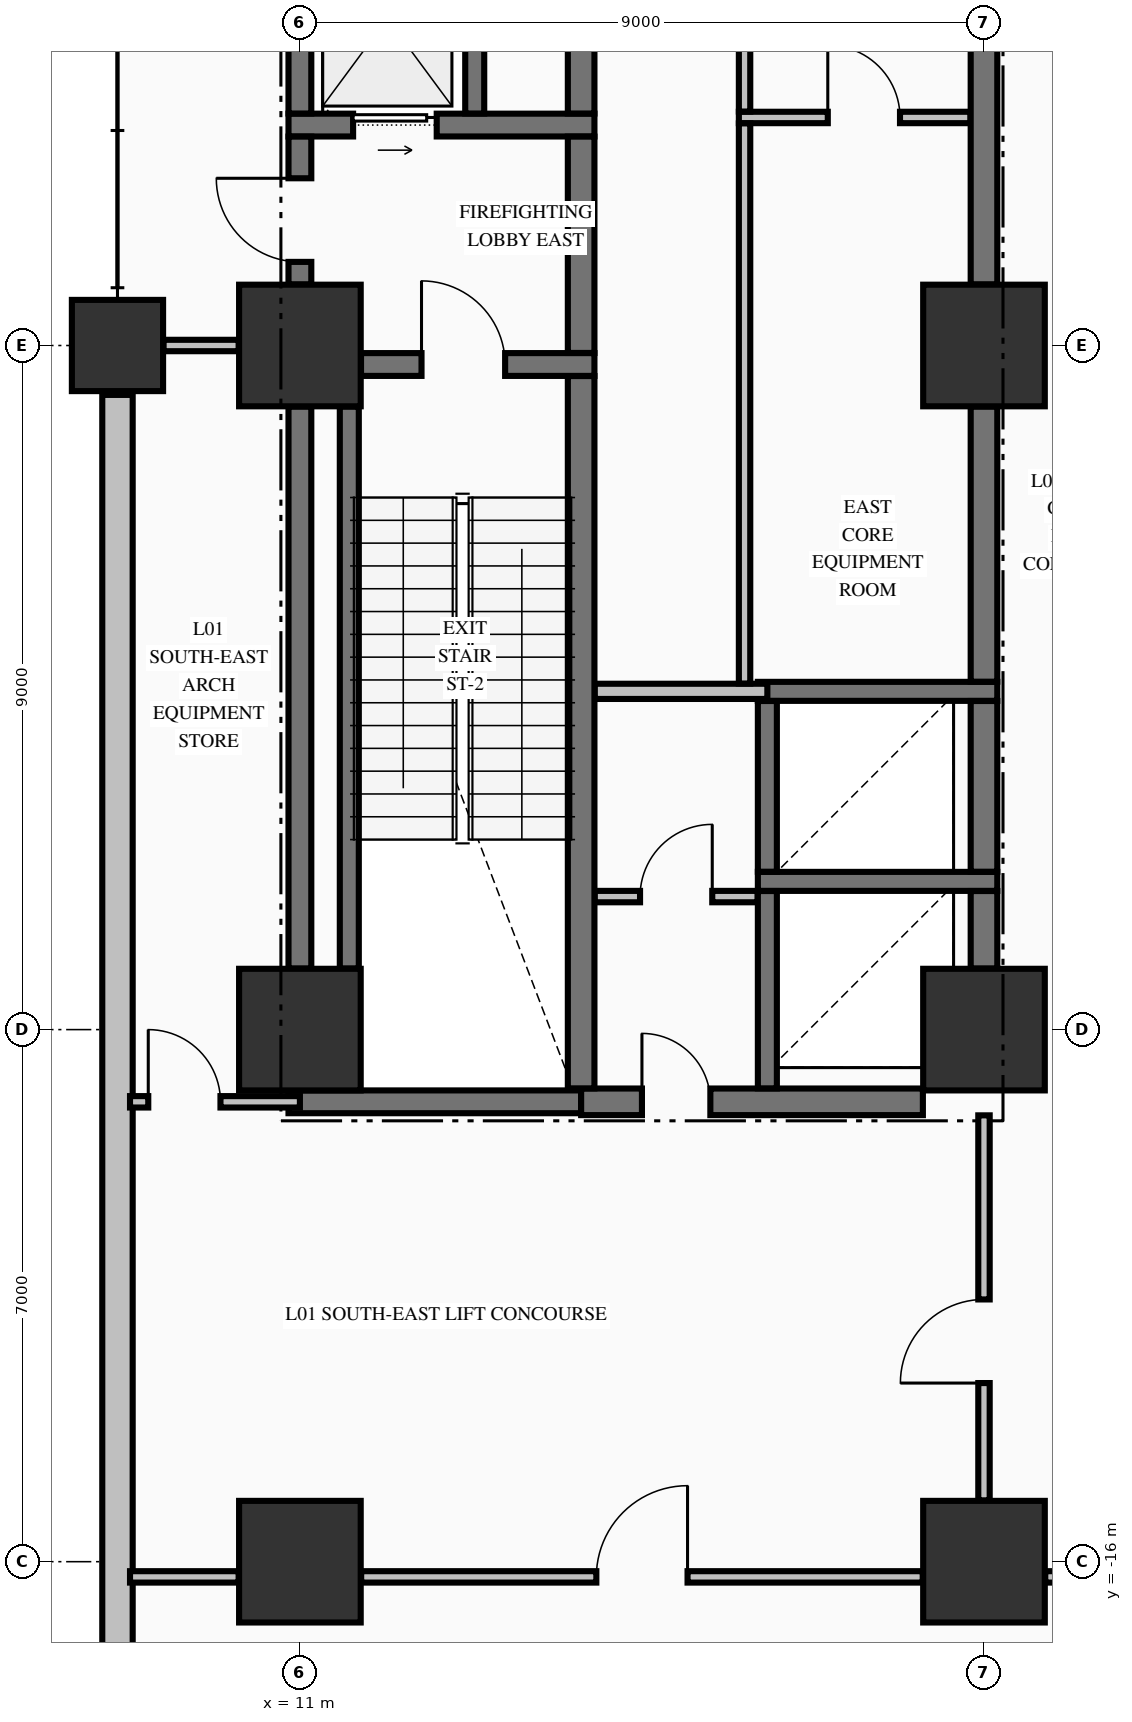
"""IFC4 building model, lengths in metres.
Left out: names, types, materials, properties, quantities, classifications, styles, units other than length and angle.
Written with IfcOpenShell. Run it as: python <this file> out.ifc"""

import sys

from ifc_helpers import new_model, si_unit, direction, frame, frame_2d, origin, origin_2d, place, context, subcontext, project, spatial, rectangle, extrude, element, fill, save


model = new_model("IFC4")
c1 = context("Model", 3, precision=1e-05, world=origin(), true_north=direction((0.0, 1.0)))
c2 = subcontext(c1, "Body", "Model", "MODEL_VIEW")
j1 = project(units=[si_unit("LENGTHUNIT", "METRE"), si_unit("PLANEANGLEUNIT", "RADIAN")], contexts=[c1])
p1 = place(None, origin())
s1 = spatial("IfcSite", under=j1, at=p1, CompositionType="ELEMENT")
p2 = place(p1, origin())
s2 = spatial("IfcBuilding", under=s1, at=p2, CompositionType="ELEMENT")
p3 = place(p2, frame((0.0, 0.0, 5.44)))
s3 = spatial("IfcBuildingStorey", under=s2, at=p3, CompositionType="ELEMENT", Elevation=5.44)
for number, where, z_axis, x_axis in (
    (1, (11.0, -16.0, 0.0), (0.0, 0.0, 1.0), (1.0, 0.0, 0.0)),
    (2, (11.0, -9.0, 0.0), (0.0, 0.0, 1.0), (1.0, 0.0, 0.0)),
    (3, (11.0, 0.0, 0.0), (0.0, 0.0, 1.0), (1.0, 0.0, 0.0)),
    (4, (20.0, -16.0, 0.0), (0.0, 0.0, 1.0), (1.0, 0.0, 0.0)),
    (5, (20.0, -9.0, 0.0), (0.0, 0.0, 1.0), (1.0, 0.0, 0.0)),
    (6, (20.0, 0.0, 0.0), (0.0, 0.0, 1.0), (1.0, 0.0, 0.0)),
):
    element("IfcColumn", number, at=place(p3, frame(where, z_axis=z_axis, x_axis=x_axis)), inside=s3, PredefinedType="COLUMN", context=c2, shape_type="SweptSolid", body=[
        extrude(rectangle(XDim=1.6, YDim=1.6, at=origin_2d()), origin(), (0.0, 0.0, 1.0), 5.09),
    ])
p4 = place(p3, frame((8.6, 0.0, 0.0), z_axis=(0.0, 0.0, 1.0), x_axis=(1.0, 0.0, 0.0)))
e7 = element("IfcColumn", 7, at=p4, inside=s3, PredefinedType="COLUMN", context=c2, shape_type="SweptSolid", body=[
    extrude(rectangle(XDim=1.2, YDim=1.2, at=origin_2d()), origin(), (0.0, 0.0, 1.0), 5.09),
])
p5 = place(p3, frame((8.6, -0.65, 0.0), z_axis=(0.0, 0.0, 1.0), x_axis=(0.0, -1.0, 0.0)))
e8 = element("IfcWall", 8, at=p5, inside=s3, PredefinedType="STANDARD", context=c2, shape_type="SweptSolid", body=[
    extrude(rectangle(XDim=24.72, YDim=0.4, at=frame_2d((12.36, 0.0))), origin(), (0.0, 0.0, 1.0), 4.132),
])
p6 = place(p3, frame((10.85, -9.95, 0.0), z_axis=(0.0, 0.0, 1.0), x_axis=(1.0, 0.0, 0.0)))
e9 = element("IfcWall", 9, at=p6, inside=s3, PredefinedType="SHEAR", context=c2, shape_type="SweptSolid", body=[
    extrude(rectangle(XDim=3.85, YDim=0.3, at=frame_2d((1.925, 0.0))), origin(), (0.0, 0.0, 1.0), 5.09),
])
p7 = place(p3, frame((14.7, -9.95, 0.0), z_axis=(0.0, 0.0, 1.0), x_axis=(1.0, 0.0, 0.0)))
e10 = element("IfcWall", 10, at=p7, inside=s3, PredefinedType="SHEAR", context=c2, shape_type="SweptSolid", body=[
    extrude(rectangle(XDim=4.496, YDim=0.35, at=frame_2d((2.248, 0.0))), origin(), (0.0, 0.0, 1.0), 5.09),
])
p8 = place(p7, frame((0.8, 0.0, 0.0)))
e11 = element("IfcOpeningElement", 11, at=p8, cuts=e10, PredefinedType="OPENING", context=c2, shape_type="SweptSolid", body=[
    extrude(rectangle(XDim=0.9, YDim=2.15, at=frame_2d((0.45, 1.075))), frame((0.0, 0.185, 0.0), z_axis=(0.0, -1.0, 0.0), x_axis=(1.0, 0.0, 0.0)), (0.0, 0.0, 1.0), 0.37),
])
for number, where, z_axis, x_axis in (
    (12, (17.025, -7.05, 0.0), (0.0, 0.0, 1.0), (1.0, 0.0, 0.0)),
    (13, (17.025, -4.55, 0.0), (0.0, 0.0, 1.0), (1.0, 0.0, 0.0)),
):
    element("IfcWall", number, at=place(p3, frame(where, z_axis=z_axis, x_axis=x_axis)), inside=s3, PredefinedType="SOLIDWALL", context=c2, shape_type="SweptSolid", body=[
        extrude(rectangle(XDim=3.15, YDim=0.25, at=frame_2d((1.575, 0.0))), origin(), (0.0, 0.0, 1.0), 5.09),
    ])
p9 = place(p3, frame((11.804, -0.25, 0.0), z_axis=(0.0, 0.0, 1.0), x_axis=(1.0, 0.0, 0.0)))
e14 = element("IfcWall", 14, at=p9, inside=s3, PredefinedType="SHEAR", context=c2, shape_type="SweptSolid", body=[
    extrude(rectangle(XDim=3.071, YDim=0.3, at=frame_2d((1.536, 0.0))), origin(), (0.0, 0.0, 1.0), 5.09),
])
p10 = place(p9, frame((0.796, 0.0, 0.0)))
e15 = element("IfcOpeningElement", 15, at=p10, cuts=e14, PredefinedType="OPENING", context=c2, shape_type="SweptSolid", body=[
    extrude(rectangle(XDim=1.1, YDim=2.15, at=frame_2d((0.55, 1.075))), frame((0.0, 0.16, 0.0), z_axis=(0.0, -1.0, 0.0), x_axis=(1.0, 0.0, 0.0)), (0.0, 0.0, 1.0), 0.32),
])
p11 = place(p3, frame((10.85, 2.9, 0.0), z_axis=(0.0, 0.0, 1.0), x_axis=(1.0, 0.0, 0.0)))
e16 = element("IfcWall", 16, at=p11, inside=s3, PredefinedType="SHEAR", context=c2, shape_type="SweptSolid", body=[
    extrude(rectangle(XDim=4.025, YDim=0.3, at=frame_2d((2.012, 0.0))), origin(), (0.0, 0.0, 1.0), 5.09),
])
p12 = place(p11, frame((0.85, 0.0, 0.0)))
e17 = element("IfcOpeningElement", 17, at=p12, cuts=e16, PredefinedType="OPENING", context=c2, shape_type="SweptSolid", body=[
    extrude(rectangle(XDim=1.1, YDim=2.2, at=frame_2d((0.55, 1.1))), frame((0.0, 0.16, 0.0), z_axis=(0.0, -1.0, 0.0), x_axis=(1.0, 0.0, 0.0)), (0.0, 0.0, 1.0), 0.32),
])
p13 = place(p3, frame((8.765, -16.2, 0.0), z_axis=(0.0, 0.0, 1.0), x_axis=(1.0, 0.0, 0.0)))
e18 = element("IfcWall", 18, at=p13, inside=s3, PredefinedType="PARTITIONING", context=c2, shape_type="SweptSolid", body=[
    extrude(rectangle(XDim=1.429, YDim=0.15, at=frame_2d((0.715, 0.0))), origin(), (0.0, 0.0, 1.0), 5.09),
])
p14 = place(p3, frame((11.806, -16.2, 0.0), z_axis=(0.0, 0.0, 1.0), x_axis=(1.0, 0.0, 0.0)))
e19 = element("IfcWall", 19, at=p14, inside=s3, PredefinedType="PARTITIONING", context=c2, shape_type="SweptSolid", body=[
    extrude(rectangle(XDim=7.388, YDim=0.15, at=frame_2d((3.694, 0.0))), origin(), (0.0, 0.0, 1.0), 4.132),
])
p15 = place(p14, frame((3.094, 0.0, 0.0)))
e20 = element("IfcOpeningElement", 20, at=p15, cuts=e19, PredefinedType="OPENING", context=c2, shape_type="SweptSolid", body=[
    extrude(rectangle(XDim=1.2, YDim=2.15, at=frame_2d((0.6, 1.075))), frame((0.0, 0.085, 0.0), z_axis=(0.0, -1.0, 0.0), x_axis=(1.0, 0.0, 0.0)), (0.0, 0.0, 1.0), 0.17),
])
p16 = place(p3, frame((20.806, -16.2, 0.0), z_axis=(0.0, 0.0, 1.0), x_axis=(1.0, 0.0, 0.0)))
e21 = element("IfcWall", 21, at=p16, inside=s3, PredefinedType="PARTITIONING", context=c2, shape_type="SweptSolid", body=[
    extrude(rectangle(XDim=4.488, YDim=0.15, at=frame_2d((2.244, 0.0))), origin(), (0.0, 0.0, 1.0), 4.132),
])
p17 = place(p16, frame((0.15, 0.0, 0.0)))
e22 = element("IfcOpeningElement", 22, at=p17, cuts=e21, PredefinedType="OPENING", context=c2, shape_type="SweptSolid", body=[
    extrude(rectangle(XDim=1.1, YDim=2.15, at=frame_2d((0.55, 1.075))), frame((0.0, 0.085, 0.0), z_axis=(0.0, -1.0, 0.0), x_axis=(1.0, 0.0, 0.0)), (0.0, 0.0, 1.0), 0.17),
])
p18 = place(p16, frame((2.844, 0.0, 0.0)))
e23 = element("IfcOpeningElement", 23, at=p18, cuts=e21, PredefinedType="OPENING", context=c2, shape_type="SweptSolid", body=[
    extrude(rectangle(XDim=1.1, YDim=2.15, at=frame_2d((0.55, 1.075))), frame((0.0, 0.085, 0.0), z_axis=(0.0, -1.0, 0.0), x_axis=(1.0, 0.0, 0.0)), (0.0, 0.0, 1.0), 0.17),
])
p19 = place(p3, frame((8.765, -9.95, 0.0), z_axis=(0.0, 0.0, 1.0), x_axis=(1.0, 0.0, 0.0)))
e24 = element("IfcWall", 24, at=p19, inside=s3, PredefinedType="PARTITIONING", context=c2, shape_type="SweptSolid", body=[
    extrude(rectangle(XDim=2.235, YDim=0.15, at=frame_2d((1.118, 0.0))), origin(), (0.0, 0.0, 1.0), 5.09),
])
p20 = place(p19, frame((0.24, 0.0, 0.0)))
e25 = element("IfcOpeningElement", 25, at=p20, cuts=e24, PredefinedType="OPENING", context=c2, shape_type="SweptSolid", body=[
    extrude(rectangle(XDim=0.95, YDim=2.15, at=frame_2d((0.475, 1.075))), frame((0.0, 0.085, 0.0), z_axis=(0.0, -1.0, 0.0), x_axis=(1.0, 0.0, 0.0)), (0.0, 0.0, 1.0), 0.17),
])
p21 = place(p3, frame((14.878, -7.25, 0.0), z_axis=(0.0, 0.0, 1.0), x_axis=(1.0, 0.0, 0.0)))
e26 = element("IfcWall", 26, at=p21, inside=s3, PredefinedType="PARTITIONING", context=c2, shape_type="SweptSolid", body=[
    extrude(rectangle(XDim=2.144, YDim=0.15, at=frame_2d((1.072, 0.0))), origin(), (0.0, 0.0, 1.0), 5.09),
])
p22 = place(p21, frame((0.597, 0.0, 0.0)))
e27 = element("IfcOpeningElement", 27, at=p22, cuts=e26, PredefinedType="OPENING", context=c2, shape_type="SweptSolid", body=[
    extrude(rectangle(XDim=0.95, YDim=2.15, at=frame_2d((0.475, 1.075))), frame((0.0, 0.085, 0.0), z_axis=(0.0, -1.0, 0.0), x_axis=(1.0, 0.0, 0.0)), (0.0, 0.0, 1.0), 0.17),
])
p23 = place(p3, frame((14.878, -4.55, 0.0), z_axis=(0.0, 0.0, 1.0), x_axis=(1.0, 0.0, 0.0)))
e28 = element("IfcWall", 28, at=p23, inside=s3, PredefinedType="PARTITIONING", context=c2, shape_type="SweptSolid", body=[
    extrude(rectangle(XDim=2.272, YDim=0.2, at=frame_2d((1.136, 0.0))), origin(), (0.0, 0.0, 1.0), 5.09),
])
p24 = place(p3, frame((9.206, 0.0, 0.0), z_axis=(0.0, 0.0, 1.0), x_axis=(1.0, 0.0, 0.0)))
e29 = element("IfcWall", 29, at=p24, inside=s3, PredefinedType="PARTITIONING", context=c2, shape_type="SweptSolid", body=[
    extrude(rectangle(XDim=0.988, YDim=0.15, at=frame_2d((0.494, 0.0))), origin(), (0.0, 0.0, 1.0), 4.132),
])
p25 = place(p3, frame((16.775, 3.0, 0.0), z_axis=(0.0, 0.0, 1.0), x_axis=(1.0, 0.0, 0.0)))
e30 = element("IfcWall", 30, at=p25, inside=s3, PredefinedType="PARTITIONING", context=c2, shape_type="SweptSolid", body=[
    extrude(rectangle(XDim=3.047, YDim=0.15, at=frame_2d((1.523, 0.0))), origin(), (0.0, 0.0, 1.0), 5.09),
])
p26 = place(p25, frame((1.17, 0.0, 0.0)))
e31 = element("IfcOpeningElement", 31, at=p26, cuts=e30, PredefinedType="OPENING", context=c2, shape_type="SweptSolid", body=[
    extrude(rectangle(XDim=0.95, YDim=2.15, at=frame_2d((0.475, 1.075))), frame((0.0, 0.085, 0.0), z_axis=(0.0, -1.0, 0.0), x_axis=(1.0, 0.0, 0.0)), (0.0, 0.0, 1.0), 0.17),
])
p27 = place(p3, frame((11.0, -8.196, 0.0), z_axis=(0.0, 0.0, 1.0), x_axis=(0.0, 1.0, 0.0)))
e32 = element("IfcWall", 32, at=p27, inside=s3, PredefinedType="SHEAR", context=c2, shape_type="SweptSolid", body=[
    extrude(rectangle(XDim=7.392, YDim=0.3, at=frame_2d((3.696, 0.0))), origin(), (0.0, 0.0, 1.0), 5.09),
])
p28 = place(p3, frame((11.0, 0.804, 0.0), z_axis=(0.0, 0.0, 1.0), x_axis=(0.0, 1.0, 0.0)))
e33 = element("IfcWall", 33, at=p28, inside=s3, PredefinedType="SHEAR", context=c2, shape_type="SweptSolid", body=[
    extrude(rectangle(XDim=1.944, YDim=0.3, at=frame_2d((0.972, 0.0))), origin(), (0.0, 0.0, 1.0), 5.09),
])
p29 = place(p28, frame((0.296, 0.0, 0.0)))
e34 = element("IfcOpeningElement", 34, at=p29, cuts=e33, PredefinedType="OPENING", context=c2, shape_type="SweptSolid", body=[
    extrude(rectangle(XDim=1.1, YDim=2.15, at=frame_2d((0.55, 1.075))), frame((0.0, 0.16, 0.0), z_axis=(0.0, -1.0, 0.0), x_axis=(1.0, 0.0, 0.0)), (0.0, 0.0, 1.0), 0.32),
])
p30 = place(p3, frame((11.0, 3.052, 0.0), z_axis=(0.0, 0.0, 1.0), x_axis=(0.0, 1.0, 0.0)))
e35 = element("IfcWall", 35, at=p30, inside=s3, PredefinedType="SHEAR", context=c2, shape_type="SweptSolid", body=[
    extrude(rectangle(XDim=2.496, YDim=0.3, at=frame_2d((1.248, 0.0))), origin(), (0.0, 0.0, 1.0), 5.09),
])
p31 = place(p3, frame((11.65, -8.196, 0.0), z_axis=(0.0, 0.0, 1.0), x_axis=(0.0, 1.0, 0.0)))
e36 = element("IfcWall", 36, at=p31, inside=s3, PredefinedType="SOLIDWALL", context=c2, shape_type="SweptSolid", body=[
    extrude(rectangle(XDim=7.392, YDim=0.25, at=frame_2d((3.696, 0.0))), origin(), (0.0, 0.0, 1.0), 5.09),
])
p32 = place(p3, frame((13.3, 3.052, 0.0), z_axis=(0.0, 0.0, 1.0), x_axis=(0.0, 1.0, 0.0)))
e37 = element("IfcWall", 37, at=p32, inside=s3, PredefinedType="SOLIDWALL", context=c2, shape_type="SweptSolid", body=[
    extrude(rectangle(XDim=2.496, YDim=0.25, at=frame_2d((1.248, 0.0))), origin(), (0.0, 0.0, 1.0), 5.09),
])
p33 = place(p3, frame((14.7, -9.773, 0.0), z_axis=(0.0, 0.0, 1.0), x_axis=(0.0, 1.0, 0.0)))
e38 = element("IfcWall", 38, at=p33, inside=s3, PredefinedType="SHEAR", context=c2, shape_type="SweptSolid", body=[
    extrude(rectangle(XDim=9.371, YDim=0.35, at=frame_2d((4.686, 0.0))), origin(), (0.0, 0.0, 1.0), 5.09),
])
p34 = place(p3, frame((14.7, -0.098, 0.0), z_axis=(0.0, 0.0, 1.0), x_axis=(0.0, 1.0, 0.0)))
e39 = element("IfcWall", 39, at=p34, inside=s3, PredefinedType="SHEAR", context=c2, shape_type="SweptSolid", body=[
    extrude(rectangle(XDim=2.846, YDim=0.35, at=frame_2d((1.423, 0.0))), origin(), (0.0, 0.0, 1.0), 5.09),
])
p35 = place(p3, frame((14.7, 3.052, 0.0), z_axis=(0.0, 0.0, 1.0), x_axis=(0.0, 1.0, 0.0)))
e40 = element("IfcWall", 40, at=p35, inside=s3, PredefinedType="SHEAR", context=c2, shape_type="SweptSolid", body=[
    extrude(rectangle(XDim=2.496, YDim=0.35, at=frame_2d((1.248, 0.0))), origin(), (0.0, 0.0, 1.0), 5.09),
])
p36 = place(p3, frame((17.15, -9.773, 0.0), z_axis=(0.0, 0.0, 1.0), x_axis=(0.0, 1.0, 0.0)))
e41 = element("IfcWall", 41, at=p36, inside=s3, PredefinedType="SOLIDWALL", context=c2, shape_type="SweptSolid", body=[
    extrude(rectangle(XDim=2.596, YDim=0.25, at=frame_2d((1.298, 0.0))), origin(), (0.0, 0.0, 1.0), 5.09),
])
p37 = place(p3, frame((17.15, -6.923, 0.0), z_axis=(0.0, 0.0, 1.0), x_axis=(0.0, 1.0, 0.0)))
e42 = element("IfcWall", 42, at=p37, inside=s3, PredefinedType="SOLIDWALL", context=c2, shape_type="SweptSolid", body=[
    extrude(rectangle(XDim=2.246, YDim=0.25, at=frame_2d((1.123, 0.0))), origin(), (0.0, 0.0, 1.0), 5.09),
])
p38 = place(p3, frame((20.0, -8.196, 0.0), z_axis=(0.0, 0.0, 1.0), x_axis=(0.0, 1.0, 0.0)))
e43 = element("IfcWall", 43, at=p38, inside=s3, PredefinedType="SHEAR", context=c2, shape_type="SweptSolid", body=[
    extrude(rectangle(XDim=1.019, YDim=0.35, at=frame_2d((0.51, 0.0))), origin(), (0.0, 0.0, 1.0), 5.09),
])
p39 = place(p3, frame((20.0, -6.923, 0.0), z_axis=(0.0, 0.0, 1.0), x_axis=(0.0, 1.0, 0.0)))
e44 = element("IfcWall", 44, at=p39, inside=s3, PredefinedType="SHEAR", context=c2, shape_type="SweptSolid", body=[
    extrude(rectangle(XDim=2.246, YDim=0.35, at=frame_2d((1.123, 0.0))), origin(), (0.0, 0.0, 1.0), 5.09),
])
p40 = place(p3, frame((20.0, -4.423, 0.0), z_axis=(0.0, 0.0, 1.0), x_axis=(0.0, 1.0, 0.0)))
e45 = element("IfcWall", 45, at=p40, inside=s3, PredefinedType="SHEAR", context=c2, shape_type="SweptSolid", body=[
    extrude(rectangle(XDim=3.619, YDim=0.35, at=frame_2d((1.81, 0.0))), origin(), (0.0, 0.0, 1.0), 5.09),
])
p41 = place(p3, frame((20.0, 0.804, 0.0), z_axis=(0.0, 0.0, 1.0), x_axis=(0.0, 1.0, 0.0)))
e46 = element("IfcWall", 46, at=p41, inside=s3, PredefinedType="SHEAR", context=c2, shape_type="SweptSolid", body=[
    extrude(rectangle(XDim=7.392, YDim=0.35, at=frame_2d((3.696, 0.0))), origin(), (0.0, 0.0, 1.0), 5.09),
])
p42 = place(p3, frame((16.85, -4.447, 0.0), z_axis=(0.0, 0.0, 1.0), x_axis=(0.0, 1.0, 0.0)))
e47 = element("IfcWall", 47, at=p42, inside=s3, PredefinedType="PARTITIONING", context=c2, shape_type="SweptSolid", body=[
    extrude(rectangle(XDim=7.369, YDim=0.15, at=frame_2d((3.685, 0.0))), origin(), (0.0, 0.0, 1.0), 5.09),
])
p43 = place(p3, frame((16.85, 3.078, 0.0), z_axis=(0.0, 0.0, 1.0), x_axis=(0.0, 1.0, 0.0)))
e48 = element("IfcWall", 48, at=p43, inside=s3, PredefinedType="PARTITIONING", context=c2, shape_type="SweptSolid", body=[
    extrude(rectangle(XDim=7.244, YDim=0.15, at=frame_2d((3.622, 0.0))), origin(), (0.0, 0.0, 1.0), 5.09),
])
p44 = place(p3, frame((20.0, -15.194, 0.0), z_axis=(0.0, 0.0, 1.0), x_axis=(0.0, 1.0, 0.0)))
e49 = element("IfcWall", 49, at=p44, inside=s3, PredefinedType="PARTITIONING", context=c2, shape_type="SweptSolid", body=[
    extrude(rectangle(XDim=5.066, YDim=0.15, at=frame_2d((2.533, 0.0))), origin(), (0.0, 0.0, 1.0), 4.132),
])
p45 = place(p44, frame((1.544, 0.0, 0.0)))
e50 = element("IfcOpeningElement", 50, at=p45, cuts=e49, PredefinedType="OPENING", context=c2, shape_type="SweptSolid", body=[
    extrude(rectangle(XDim=1.1, YDim=2.15, at=frame_2d((0.55, 1.075))), frame((0.0, 0.085, 0.0), z_axis=(0.0, -1.0, 0.0), x_axis=(1.0, 0.0, 0.0)), (0.0, 0.0, 1.0), 0.17),
])
p46 = place(p10, origin())
e51 = element("IfcDoor", 51, at=p46, inside=s3, OperationType="SINGLE_SWING_LEFT", PredefinedType="DOOR", context=c2, shape_type="SweptSolid", body=[
    extrude(rectangle(XDim=1.1, YDim=2.15, at=frame_2d((0.55, 1.075))), frame((0.0, 0.025, 0.0), z_axis=(0.0, -1.0, 0.0), x_axis=(1.0, 0.0, 0.0)), (0.0, 0.0, 1.0), 0.05),
])
fill(e15, e51)
p47 = place(p29, origin())
e52 = element("IfcDoor", 52, at=p47, inside=s3, OperationType="SINGLE_SWING_RIGHT", PredefinedType="DOOR", context=c2, shape_type="SweptSolid", body=[
    extrude(rectangle(XDim=1.1, YDim=2.15, at=frame_2d((0.55, 1.075))), frame((0.0, 0.025, 0.0), z_axis=(0.0, -1.0, 0.0), x_axis=(1.0, 0.0, 0.0)), (0.0, 0.0, 1.0), 0.05),
])
fill(e34, e52)
p48 = place(p12, origin())
e53 = element("IfcDoor", 53, at=p48, inside=s3, OperationType="SLIDING_TO_RIGHT", PredefinedType="DOOR", context=c2, shape_type="SweptSolid", body=[
    extrude(rectangle(XDim=1.1, YDim=2.2, at=frame_2d((0.55, 1.1))), frame((0.0, 0.025, 0.0), z_axis=(0.0, -1.0, 0.0), x_axis=(1.0, 0.0, 0.0)), (0.0, 0.0, 1.0), 0.05),
])
fill(e17, e53)
p49 = place(p8, origin())
e54 = element("IfcDoor", 54, at=p49, inside=s3, OperationType="SINGLE_SWING_LEFT", PredefinedType="DOOR", context=c2, shape_type="SweptSolid", body=[
    extrude(rectangle(XDim=0.9, YDim=2.15, at=frame_2d((0.45, 1.075))), frame((0.0, 0.025, 0.0), z_axis=(0.0, -1.0, 0.0), x_axis=(1.0, 0.0, 0.0)), (0.0, 0.0, 1.0), 0.05),
])
fill(e11, e54)
p50 = place(p22, origin())
e55 = element("IfcDoor", 55, at=p50, inside=s3, OperationType="SINGLE_SWING_RIGHT", PredefinedType="DOOR", context=c2, shape_type="SweptSolid", body=[
    extrude(rectangle(XDim=0.95, YDim=2.15, at=frame_2d((0.475, 1.075))), frame((0.0, 0.025, 0.0), z_axis=(0.0, -1.0, 0.0), x_axis=(1.0, 0.0, 0.0)), (0.0, 0.0, 1.0), 0.05),
])
fill(e27, e55)
p51 = place(p26, origin())
e56 = element("IfcDoor", 56, at=p51, inside=s3, OperationType="SINGLE_SWING_LEFT", PredefinedType="DOOR", context=c2, shape_type="SweptSolid", body=[
    extrude(rectangle(XDim=0.95, YDim=2.15, at=frame_2d((0.475, 1.075))), frame((0.0, 0.025, 0.0), z_axis=(0.0, -1.0, 0.0), x_axis=(1.0, 0.0, 0.0)), (0.0, 0.0, 1.0), 0.05),
])
fill(e31, e56)
p52 = place(p20, origin())
e57 = element("IfcDoor", 57, at=p52, inside=s3, OperationType="SINGLE_SWING_LEFT", PredefinedType="DOOR", context=c2, shape_type="SweptSolid", body=[
    extrude(rectangle(XDim=0.95, YDim=2.15, at=frame_2d((0.475, 1.075))), frame((0.0, 0.025, 0.0), z_axis=(0.0, -1.0, 0.0), x_axis=(1.0, 0.0, 0.0)), (0.0, 0.0, 1.0), 0.05),
])
fill(e25, e57)
p53 = place(p45, origin())
e58 = element("IfcDoor", 58, at=p53, inside=s3, OperationType="SINGLE_SWING_LEFT", PredefinedType="DOOR", context=c2, shape_type="SweptSolid", body=[
    extrude(rectangle(XDim=1.1, YDim=2.15, at=frame_2d((0.55, 1.075))), frame((0.0, 0.025, 0.0), z_axis=(0.0, -1.0, 0.0), x_axis=(1.0, 0.0, 0.0)), (0.0, 0.0, 1.0), 0.05),
])
fill(e50, e58)
p54 = place(p15, origin())
e59 = element("IfcDoor", 59, at=p54, inside=s3, OperationType="SINGLE_SWING_RIGHT", PredefinedType="DOOR", context=c2, shape_type="SweptSolid", body=[
    extrude(rectangle(XDim=1.2, YDim=2.15, at=frame_2d((0.6, 1.075))), frame((0.0, 0.025, 0.0), z_axis=(0.0, -1.0, 0.0), x_axis=(1.0, 0.0, 0.0)), (0.0, 0.0, 1.0), 0.05),
])
fill(e20, e59)
save(model, sys.argv[1])
